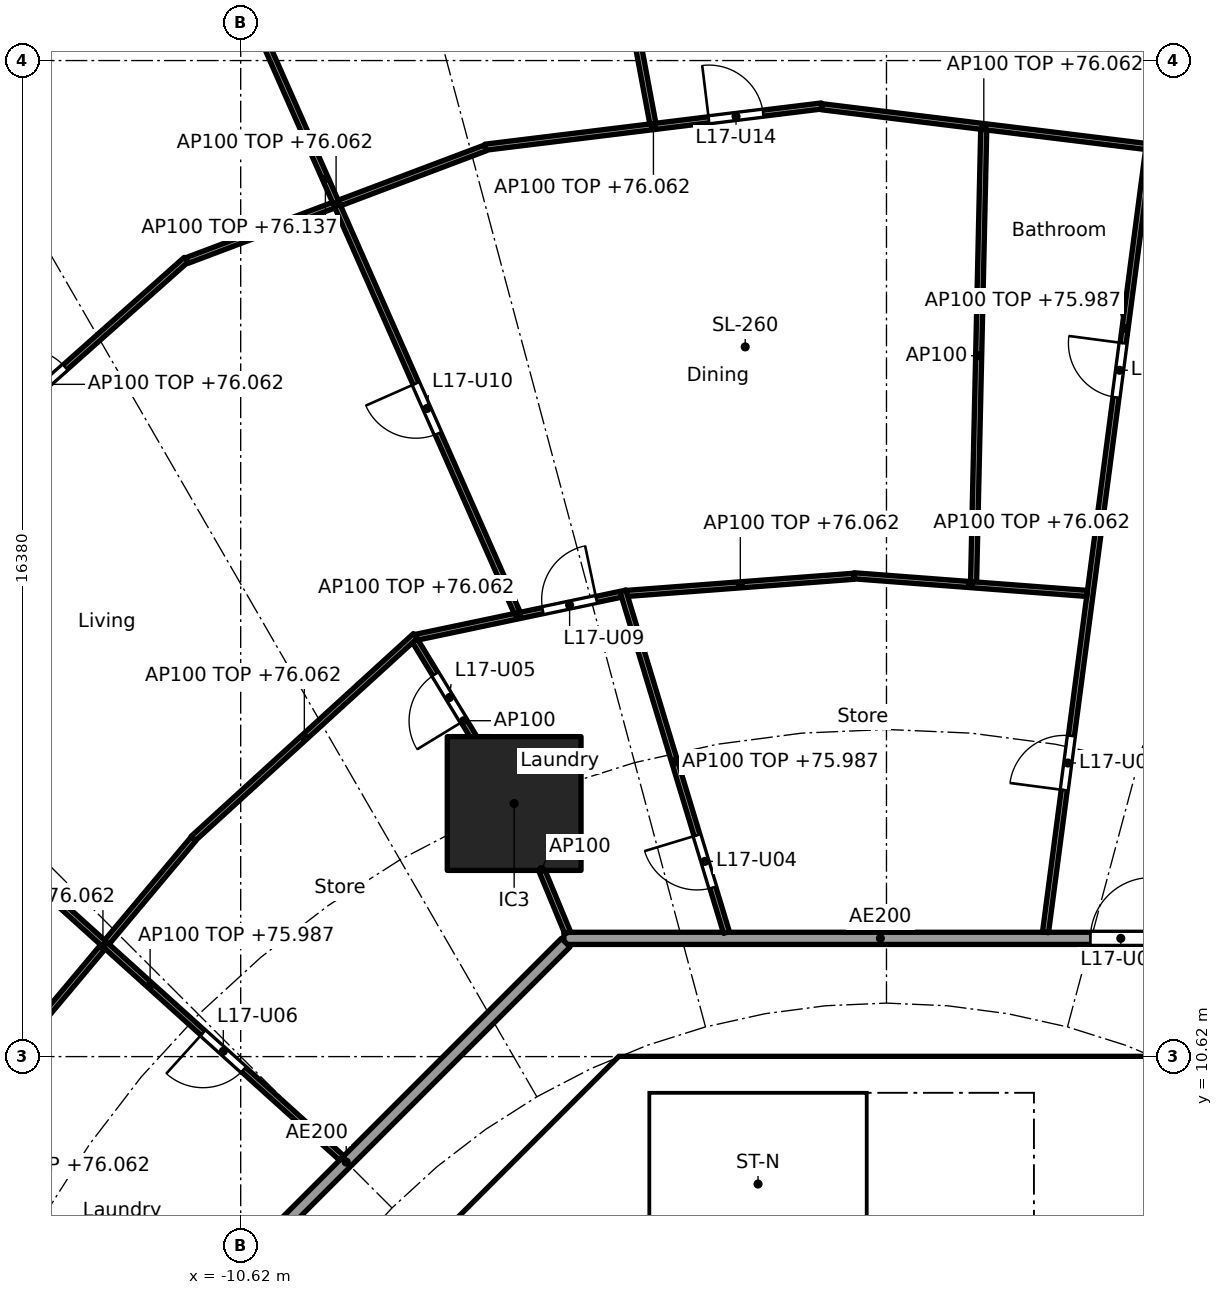
"""IFC4 building model, lengths in metres.
Left out: names, types, materials, properties, quantities, classifications, styles, units other than length and angle.
Written with IfcOpenShell. Run it as: python <this file> out.ifc"""

import sys

from ifc_helpers import new_model, si_unit, direction, frame, frame_2d, origin, origin_2d, place, context, subcontext, project, spatial, polyline, rectangle, outline, extrude, element, fill, save


model = new_model("IFC4")
c1 = context("Model", 3, precision=1e-05, world=origin(), true_north=direction((0.0, 1.0)))
c2 = subcontext(c1, "Body", "Model", "MODEL_VIEW")
j1 = project(units=[si_unit("LENGTHUNIT", "METRE"), si_unit("PLANEANGLEUNIT", "RADIAN")], contexts=[c1])
p1 = place(None, origin())
s1 = spatial("IfcSite", under=j1, at=p1, CompositionType="ELEMENT")
p2 = place(p1, origin())
s2 = spatial("IfcBuilding", under=s1, at=p2, CompositionType="ELEMENT")
p3 = place(p2, frame((0.0, 0.0, 73.3)))
s3 = spatial("IfcBuildingStorey", under=s2, at=p3, CompositionType="ELEMENT", Elevation=73.3)
p4 = place(p3, frame((-6.123, 14.782, 0.0), z_axis=(0.0, 0.0, 1.0), x_axis=(1.0, 0.0, 0.0)))
e1 = element("IfcColumn", 1, at=p4, inside=s3, PredefinedType="COLUMN", context=c2, shape_type="SweptSolid", body=[
    extrude(rectangle(XDim=2.2, YDim=2.2, at=origin_2d()), origin(), (0.0, 0.0, 1.0), 3.7),
])
p5 = place(p3, frame((-4.613, 9.988, 0.0), z_axis=(0.0, 0.0, 1.0), x_axis=(-0.707106781187, -0.707106781187, 0.0)))
e2 = element("IfcWall", 2, at=p5, inside=s3, PredefinedType="SHEAR", context=c2, shape_type="SweptSolid", body=[
    extrude(rectangle(XDim=7.602, YDim=0.6, at=frame_2d((3.801, 0.0))), origin(), (0.0, 0.0, 1.0), 3.44),
])
p6 = place(p5, frame((0.351, 0.0, 0.0)))
e3 = element("IfcOpeningElement", 3, at=p6, cuts=e2, PredefinedType="OPENING", context=c2, shape_type="SweptSolid", body=[
    extrude(rectangle(XDim=1.1, YDim=2.1, at=frame_2d((0.55, 1.05))), frame((0.0, 0.31, 0.0), z_axis=(0.0, -1.0, 0.0), x_axis=(1.0, 0.0, 0.0)), (0.0, 0.0, 1.0), 0.62),
])
p7 = place(p3, frame((4.0, 7.025, 0.0), z_axis=(0.0, 0.0, 1.0), x_axis=(0.0, 1.0, 0.0)))
e4 = element("IfcWall", 4, at=p7, inside=s3, PredefinedType="SOLIDWALL", context=c2, shape_type="SweptSolid", body=[
    extrude(rectangle(XDim=3.0, YDim=0.2, at=frame_2d((1.5, 0.0))), origin(), (0.0, 0.0, 1.0), 3.44),
])
p8 = place(p7, frame((0.925, 0.0, 0.0)))
e5 = element("IfcOpeningElement", 5, at=p8, cuts=e4, PredefinedType="OPENING", context=c2, shape_type="SweptSolid", body=[
    extrude(rectangle(XDim=1.1, YDim=2.1, at=frame_2d((0.55, 1.05))), frame((0.0, 0.11, 0.0), z_axis=(0.0, -1.0, 0.0), x_axis=(1.0, 0.0, 0.0)), (0.0, 0.0, 1.0), 0.22),
])
p9 = place(p3, origin())
e6 = element("IfcWall", 6, at=p9, inside=s3, PredefinedType="SHEAR", context=c2, shape_type="SweptSolid", body=[
    extrude(outline(polyline([(-4.152, 10.025), (-4.401, 9.776), (-4.825, 10.2), (-4.401, 10.625), (4.401, 10.625), (4.825, 10.2), (4.401, 9.776), (4.152, 10.025), (-4.152, 10.025)])), origin(), (0.0, 0.0, 1.0), 3.44),
])
p10 = place(p3, origin())
e7 = element("IfcWall", 7, at=p10, inside=s3, PredefinedType="SOLIDWALL", context=c2, shape_type="SweptSolid", body=[
    extrude(outline(polyline([(-3.9, 7.025), (-4.1, 7.025), (-4.1, 10.025), (-3.9, 10.025), (-3.9, 7.025)])), origin(), (0.0, 0.0, 1.0), 3.44),
])
p11 = place(p3, frame((5.104, 12.565, 0.0), z_axis=(0.0, 0.0, 1.0), x_axis=(-1.0, 0.0, 0.0)))
e8 = element("IfcWall", 8, at=p11, inside=s3, PredefinedType="PARTITIONING", context=c2, shape_type="SweptSolid", body=[
    extrude(rectangle(XDim=10.409, YDim=0.2, at=frame_2d((5.205, 0.0))), origin(), (0.0, 0.0, 1.0), 3.44),
])
p12 = place(p11, frame((0.751, 0.0, 0.0)))
e9 = element("IfcOpeningElement", 9, at=p12, cuts=e8, PredefinedType="OPENING", context=c2, shape_type="SweptSolid", body=[
    extrude(rectangle(XDim=1.0, YDim=2.1, at=frame_2d((0.5, 1.05))), frame((0.0, 0.11, 0.0), z_axis=(0.0, -1.0, 0.0), x_axis=(1.0, 0.0, 0.0)), (0.0, 0.0, 1.0), 0.22),
])
p13 = place(p3, frame((-5.275, 12.494, 0.0), z_axis=(0.0, 0.0, 1.0), x_axis=(-0.707106781187, -0.707106781187, 0.0)))
e10 = element("IfcWall", 10, at=p13, inside=s3, PredefinedType="PARTITIONING", context=c2, shape_type="SweptSolid", body=[
    extrude(rectangle(XDim=10.209, YDim=0.2, at=frame_2d((5.104, 0.0))), origin(), (0.0, 0.0, 1.0), 3.44),
])
p14 = place(p3, frame((2.615, 12.664, 0.0), z_axis=(0.0, 0.0, 1.0), x_axis=(0.130614967904, 0.99143316979, 0.0)))
e11 = element("IfcWall", 11, at=p14, inside=s3, PredefinedType="PARTITIONING", context=c2, shape_type="SweptSolid", body=[
    extrude(rectangle(XDim=20.034, YDim=0.1, at=frame_2d((10.017, 0.0))), origin(), (0.0, 0.0, 1.0), 2.687),
])
p15 = place(p14, frame((2.359, 0.0, 0.0)))
e12 = element("IfcOpeningElement", 12, at=p15, cuts=e11, PredefinedType="OPENING", context=c2, shape_type="SweptSolid", body=[
    extrude(rectangle(XDim=0.9, YDim=2.1, at=frame_2d((0.45, 1.05))), frame((0.0, 0.06, 0.0), z_axis=(0.0, -1.0, 0.0), x_axis=(1.0, 0.0, 0.0)), (0.0, 0.0, 1.0), 0.12),
])
p16 = place(p14, frame((8.873, 0.0, 0.0)))
e13 = element("IfcOpeningElement", 13, at=p16, cuts=e11, PredefinedType="OPENING", context=c2, shape_type="SweptSolid", body=[
    extrude(rectangle(XDim=0.9, YDim=2.1, at=frame_2d((0.45, 1.05))), frame((0.0, 0.06, 0.0), z_axis=(0.0, -1.0, 0.0), x_axis=(1.0, 0.0, 0.0)), (0.0, 0.0, 1.0), 0.12),
])
p17 = place(p3, frame((3.299, 18.237, 0.0), z_axis=(0.0, 0.0, 1.0), x_axis=(-0.997152243414, 0.075414875552, 0.0)))
e14 = element("IfcWall", 14, at=p17, inside=s3, PredefinedType="PARTITIONING", context=c2, shape_type="SweptSolid", body=[
    extrude(rectangle(XDim=3.846, YDim=0.1, at=frame_2d((1.923, 0.0))), origin(), (0.0, 0.0, 1.0), 2.762),
])
p18 = place(p3, frame((4.267, 25.587, 0.0), z_axis=(0.0, 0.0, 1.0), x_axis=(-0.992576206119, 0.121624319302, 0.0)))
e15 = element("IfcWall", 15, at=p18, inside=s3, PredefinedType="PARTITIONING", context=c2, shape_type="SweptSolid", body=[
    extrude(rectangle(XDim=5.374, YDim=0.1, at=frame_2d((2.687, 0.0))), origin(), (0.0, 0.0, 1.0), 2.762),
])
p19 = place(p3, frame((1.433, 18.428, 0.0), z_axis=(0.0, 0.0, 1.0), x_axis=(0.022419421812, 0.999748653175, 0.0)))
e16 = element("IfcWall", 16, at=p19, inside=s3, PredefinedType="PARTITIONING", context=c2, shape_type="SweptSolid", body=[
    extrude(rectangle(XDim=7.438, YDim=0.1, at=frame_2d((3.719, 0.0))), origin(), (0.0, 0.0, 1.0), 3.44),
])
p20 = place(p3, frame((-0.536, 18.519, 0.0), z_axis=(0.0, 0.0, 1.0), x_axis=(-0.99715294352, -0.075405618017, 0.0)))
e17 = element("IfcWall", 17, at=p20, inside=s3, PredefinedType="PARTITIONING", context=c2, shape_type="SweptSolid", body=[
    extrude(rectangle(XDim=3.746, YDim=0.1, at=frame_2d((1.873, 0.0))), origin(), (0.0, 0.0, 1.0), 2.762),
])
p21 = place(p3, frame((-1.066, 26.253, 0.0), z_axis=(0.0, 0.0, 1.0), x_axis=(-0.992574197255, -0.121640712523, 0.0)))
e18 = element("IfcWall", 18, at=p21, inside=s3, PredefinedType="PARTITIONING", context=c2, shape_type="SweptSolid", body=[
    extrude(rectangle(XDim=5.574, YDim=0.1, at=frame_2d((2.787, 0.0))), origin(), (0.0, 0.0, 1.0), 2.762),
])
p22 = place(p21, frame((0.969, 0.0, 0.0)))
e19 = element("IfcOpeningElement", 19, at=p22, cuts=e18, PredefinedType="OPENING", context=c2, shape_type="SweptSolid", body=[
    extrude(rectangle(XDim=0.9, YDim=2.1, at=frame_2d((0.45, 1.05))), frame((0.0, 0.06, 0.0), z_axis=(0.0, -1.0, 0.0), x_axis=(1.0, 0.0, 0.0)), (0.0, 0.0, 1.0), 0.12),
])
p23 = place(p3, frame((-3.842, 25.963, 0.0), z_axis=(0.0, 0.0, 1.0), x_axis=(-0.184068442651, 0.982913428752, 0.0)))
e20 = element("IfcWall", 20, at=p23, inside=s3, PredefinedType="PARTITIONING", context=c2, shape_type="SweptSolid", body=[
    extrude(rectangle(XDim=8.506, YDim=0.1, at=frame_2d((4.253, 0.0))), origin(), (0.0, 0.0, 1.0), 2.837),
])
p24 = place(p23, frame((3.803, 0.0, 0.0)))
e21 = element("IfcOpeningElement", 21, at=p24, cuts=e20, PredefinedType="OPENING", context=c2, shape_type="SweptSolid", body=[
    extrude(rectangle(XDim=0.9, YDim=2.1, at=frame_2d((0.45, 1.05))), frame((0.0, 0.06, 0.0), z_axis=(0.0, -1.0, 0.0), x_axis=(1.0, 0.0, 0.0)), (0.0, 0.0, 1.0), 0.12),
])
p25 = place(p3, frame((-2.631, 12.66, 0.0), z_axis=(0.0, 0.0, 1.0), x_axis=(-0.290145836284, 0.956982441682, 0.0)))
e22 = element("IfcWall", 22, at=p25, inside=s3, PredefinedType="PARTITIONING", context=c2, shape_type="SweptSolid", body=[
    extrude(rectangle(XDim=5.873, YDim=0.1, at=frame_2d((2.937, 0.0))), origin(), (0.0, 0.0, 1.0), 2.687),
])
p26 = place(p25, frame((0.772, 0.0, 0.0)))
e23 = element("IfcOpeningElement", 23, at=p26, cuts=e22, PredefinedType="OPENING", context=c2, shape_type="SweptSolid", body=[
    extrude(rectangle(XDim=0.9, YDim=2.1, at=frame_2d((0.45, 1.05))), frame((0.0, 0.06, 0.0), z_axis=(0.0, -1.0, 0.0), x_axis=(1.0, 0.0, 0.0)), (0.0, 0.0, 1.0), 0.12),
])
p27 = place(p3, frame((-4.37, 18.223, 0.0), z_axis=(0.0, 0.0, 1.0), x_axis=(-0.978619056583, -0.205681166112, 0.0)))
e24 = element("IfcWall", 24, at=p27, inside=s3, PredefinedType="PARTITIONING", context=c2, shape_type="SweptSolid", body=[
    extrude(rectangle(XDim=3.438, YDim=0.1, at=frame_2d((1.719, 0.0))), origin(), (0.0, 0.0, 1.0), 2.762),
])
p28 = place(p27, frame((0.409, 0.0, 0.0)))
e25 = element("IfcOpeningElement", 25, at=p28, cuts=e24, PredefinedType="OPENING", context=c2, shape_type="SweptSolid", body=[
    extrude(rectangle(XDim=0.9, YDim=2.1, at=frame_2d((0.45, 1.05))), frame((0.0, 0.06, 0.0), z_axis=(0.0, -1.0, 0.0), x_axis=(1.0, 0.0, 0.0)), (0.0, 0.0, 1.0), 0.12),
])
p29 = place(p3, frame((-6.596, 25.563, 0.0), z_axis=(0.0, 0.0, 1.0), x_axis=(-0.9356162121, -0.353018843201, 0.0)))
e26 = element("IfcWall", 26, at=p29, inside=s3, PredefinedType="PARTITIONING", context=c2, shape_type="SweptSolid", body=[
    extrude(rectangle(XDim=5.249, YDim=0.1, at=frame_2d((2.625, 0.0))), origin(), (0.0, 0.0, 1.0), 2.762),
])
p30 = place(p3, frame((-6.072, 17.915, 0.0), z_axis=(0.0, 0.0, 1.0), x_axis=(-0.404139814253, 0.914697223422, 0.0)))
e27 = element("IfcWall", 27, at=p30, inside=s3, PredefinedType="PARTITIONING", context=c2, shape_type="SweptSolid", body=[
    extrude(rectangle(XDim=15.614, YDim=0.1, at=frame_2d((7.807, 0.0))), origin(), (0.0, 0.0, 1.0), 2.837),
])
p31 = place(p30, frame((3.226, 0.0, 0.0)))
e28 = element("IfcOpeningElement", 28, at=p31, cuts=e27, PredefinedType="OPENING", context=c2, shape_type="SweptSolid", body=[
    extrude(rectangle(XDim=0.9, YDim=2.1, at=frame_2d((0.45, 1.05))), frame((0.0, 0.06, 0.0), z_axis=(0.0, -1.0, 0.0), x_axis=(1.0, 0.0, 0.0)), (0.0, 0.0, 1.0), 0.12),
])
p32 = place(p3, frame((-5.243, 12.657, 0.0), z_axis=(0.0, 0.0, 1.0), x_axis=(-0.382703272338, 0.923871314276, 0.0)))
e29 = element("IfcWall", 29, at=p32, inside=s3, PredefinedType="PARTITIONING", context=c2, shape_type="SweptSolid", body=[
    extrude(rectangle(XDim=2.249, YDim=0.1, at=frame_2d((1.125, 0.0))), origin(), (0.0, 0.0, 1.0), 3.44),
])
p33 = place(p3, frame((-6.149, 14.825, 0.0), z_axis=(0.0, 0.0, 1.0), x_axis=(-0.520433196839, 0.853902387646, 0.0)))
e30 = element("IfcWall", 30, at=p33, inside=s3, PredefinedType="PARTITIONING", context=c2, shape_type="SweptSolid", body=[
    extrude(rectangle(XDim=3.09, YDim=0.1, at=frame_2d((1.545, 0.0))), origin(), (0.0, 0.0, 1.0), 3.44),
])
p34 = place(p33, frame((1.542, 0.0, 0.0)))
e31 = element("IfcOpeningElement", 31, at=p34, cuts=e30, PredefinedType="OPENING", context=c2, shape_type="SweptSolid", body=[
    extrude(rectangle(XDim=0.9, YDim=2.1, at=frame_2d((0.45, 1.05))), frame((0.0, 0.06, 0.0), z_axis=(0.0, -1.0, 0.0), x_axis=(1.0, 0.0, 0.0)), (0.0, 0.0, 1.0), 0.12),
])
p35 = place(p3, frame((-7.746, 17.539, 0.0), z_axis=(0.0, 0.0, 1.0), x_axis=(-0.738860434967, -0.673858484877, 0.0)))
e32 = element("IfcWall", 32, at=p35, inside=s3, PredefinedType="PARTITIONING", context=c2, shape_type="SweptSolid", body=[
    extrude(rectangle(XDim=4.947, YDim=0.1, at=frame_2d((2.473, 0.0))), origin(), (0.0, 0.0, 1.0), 2.762),
])
p36 = place(p3, frame((-11.516, 23.726, 0.0), z_axis=(0.0, 0.0, 1.0), x_axis=(-0.747428955243, -0.664341747043, 0.0)))
e33 = element("IfcWall", 33, at=p36, inside=s3, PredefinedType="PARTITIONING", context=c2, shape_type="SweptSolid", body=[
    extrude(rectangle(XDim=6.174, YDim=0.1, at=frame_2d((3.087, 0.0))), origin(), (0.0, 0.0, 1.0), 2.762),
])
p37 = place(p36, frame((2.662, 0.0, 0.0)))
e34 = element("IfcOpeningElement", 34, at=p37, cuts=e33, PredefinedType="OPENING", context=c2, shape_type="SweptSolid", body=[
    extrude(rectangle(XDim=0.9, YDim=2.1, at=frame_2d((0.45, 1.05))), frame((0.0, 0.06, 0.0), z_axis=(0.0, -1.0, 0.0), x_axis=(1.0, 0.0, 0.0)), (0.0, 0.0, 1.0), 0.12),
])
p38 = place(p3, frame((-11.396, 14.202, 0.0), z_axis=(0.0, 0.0, 1.0), x_axis=(-0.642475660273, -0.766306091557, 0.0)))
e35 = element("IfcWall", 35, at=p38, inside=s3, PredefinedType="PARTITIONING", context=c2, shape_type="SweptSolid", body=[
    extrude(rectangle(XDim=4.637, YDim=0.1, at=frame_2d((2.319, 0.0))), origin(), (0.0, 0.0, 1.0), 2.762),
])
p39 = place(p3, frame((-8.959, 8.952, 0.0), z_axis=(0.0, 0.0, 1.0), x_axis=(-0.742679904999, 0.669646592398, 0.0)))
e36 = element("IfcWall", 36, at=p39, inside=s3, PredefinedType="PARTITIONING", context=c2, shape_type="SweptSolid", body=[
    extrude(rectangle(XDim=12.121, YDim=0.1, at=frame_2d((6.061, 0.0))), origin(), (0.0, 0.0, 1.0), 2.687),
])
p40 = place(p39, frame((2.172, 0.0, 0.0)))
e37 = element("IfcOpeningElement", 37, at=p40, cuts=e36, PredefinedType="OPENING", context=c2, shape_type="SweptSolid", body=[
    extrude(rectangle(XDim=0.9, YDim=2.1, at=frame_2d((0.45, 1.05))), frame((0.0, 0.06, 0.0), z_axis=(0.0, -1.0, 0.0), x_axis=(1.0, 0.0, 0.0)), (0.0, 0.0, 1.0), 0.12),
])
p41 = place(p39, frame((8.233, 0.0, 0.0)))
e38 = element("IfcOpeningElement", 38, at=p41, cuts=e36, PredefinedType="OPENING", context=c2, shape_type="SweptSolid", body=[
    extrude(rectangle(XDim=0.9, YDim=2.1, at=frame_2d((0.45, 1.05))), frame((0.0, 0.06, 0.0), z_axis=(0.0, -1.0, 0.0), x_axis=(1.0, 0.0, 0.0)), (0.0, 0.0, 1.0), 0.12),
])
p42 = place(p8, origin())
e39 = element("IfcDoor", 39, at=p42, inside=s3, OperationType="SINGLE_SWING_LEFT", PredefinedType="DOOR", context=c2, shape_type="SweptSolid", body=[
    extrude(rectangle(XDim=1.1, YDim=2.1, at=frame_2d((0.55, 1.05))), frame((0.0, 0.025, 0.0), z_axis=(0.0, -1.0, 0.0), x_axis=(1.0, 0.0, 0.0)), (0.0, 0.0, 1.0), 0.05),
])
fill(e5, e39)
p43 = place(p6, origin())
e40 = element("IfcDoor", 40, at=p43, inside=s3, OperationType="SINGLE_SWING_LEFT", PredefinedType="DOOR", context=c2, shape_type="SweptSolid", body=[
    extrude(rectangle(XDim=1.1, YDim=2.1, at=frame_2d((0.55, 1.05))), frame((0.0, 0.025, 0.0), z_axis=(0.0, -1.0, 0.0), x_axis=(1.0, 0.0, 0.0)), (0.0, 0.0, 1.0), 0.05),
])
fill(e3, e40)
p44 = place(p12, frame((1.0, 0.0, 0.0), x_axis=(-1.0, 0.0, 0.0)))
e41 = element("IfcDoor", 41, at=p44, inside=s3, OperationType="SINGLE_SWING_RIGHT", PredefinedType="DOOR", context=c2, shape_type="SweptSolid", body=[
    extrude(rectangle(XDim=1.0, YDim=2.1, at=frame_2d((0.5, 1.05))), frame((0.0, 0.025, 0.0), z_axis=(0.0, -1.0, 0.0), x_axis=(1.0, 0.0, 0.0)), (0.0, 0.0, 1.0), 0.05),
])
fill(e9, e41)
p45 = place(p15, origin())
e42 = element("IfcDoor", 42, at=p45, inside=s3, OperationType="SINGLE_SWING_LEFT", PredefinedType="DOOR", context=c2, shape_type="SweptSolid", body=[
    extrude(rectangle(XDim=0.9, YDim=2.1, at=frame_2d((0.45, 1.05))), frame((0.0, 0.025, 0.0), z_axis=(0.0, -1.0, 0.0), x_axis=(1.0, 0.0, 0.0)), (0.0, 0.0, 1.0), 0.05),
])
fill(e12, e42)
p46 = place(p26, origin())
e43 = element("IfcDoor", 43, at=p46, inside=s3, OperationType="SINGLE_SWING_RIGHT", PredefinedType="DOOR", context=c2, shape_type="SweptSolid", body=[
    extrude(rectangle(XDim=0.9, YDim=2.1, at=frame_2d((0.45, 1.05))), frame((0.0, 0.025, 0.0), z_axis=(0.0, -1.0, 0.0), x_axis=(1.0, 0.0, 0.0)), (0.0, 0.0, 1.0), 0.05),
])
fill(e23, e43)
p47 = place(p34, origin())
e44 = element("IfcDoor", 44, at=p47, inside=s3, OperationType="SINGLE_SWING_LEFT", PredefinedType="DOOR", context=c2, shape_type="SweptSolid", body=[
    extrude(rectangle(XDim=0.9, YDim=2.1, at=frame_2d((0.45, 1.05))), frame((0.0, 0.025, 0.0), z_axis=(0.0, -1.0, 0.0), x_axis=(1.0, 0.0, 0.0)), (0.0, 0.0, 1.0), 0.05),
])
fill(e31, e44)
p48 = place(p40, origin())
e45 = element("IfcDoor", 45, at=p48, inside=s3, OperationType="SINGLE_SWING_RIGHT", PredefinedType="DOOR", context=c2, shape_type="SweptSolid", body=[
    extrude(rectangle(XDim=0.9, YDim=2.1, at=frame_2d((0.45, 1.05))), frame((0.0, 0.025, 0.0), z_axis=(0.0, -1.0, 0.0), x_axis=(1.0, 0.0, 0.0)), (0.0, 0.0, 1.0), 0.05),
])
fill(e37, e45)
p49 = place(p16, origin())
e46 = element("IfcDoor", 46, at=p49, inside=s3, OperationType="SINGLE_SWING_RIGHT", PredefinedType="DOOR", context=c2, shape_type="SweptSolid", body=[
    extrude(rectangle(XDim=0.9, YDim=2.1, at=frame_2d((0.45, 1.05))), frame((0.0, 0.025, 0.0), z_axis=(0.0, -1.0, 0.0), x_axis=(1.0, 0.0, 0.0)), (0.0, 0.0, 1.0), 0.05),
])
fill(e13, e46)
p50 = place(p28, frame((0.9, 0.0, 0.0), x_axis=(-1.0, 0.0, 0.0)))
e47 = element("IfcDoor", 47, at=p50, inside=s3, OperationType="SINGLE_SWING_RIGHT", PredefinedType="DOOR", context=c2, shape_type="SweptSolid", body=[
    extrude(rectangle(XDim=0.9, YDim=2.1, at=frame_2d((0.45, 1.05))), frame((0.0, 0.025, 0.0), z_axis=(0.0, -1.0, 0.0), x_axis=(1.0, 0.0, 0.0)), (0.0, 0.0, 1.0), 0.05),
])
fill(e25, e47)
p51 = place(p31, origin())
e48 = element("IfcDoor", 48, at=p51, inside=s3, OperationType="SINGLE_SWING_RIGHT", PredefinedType="DOOR", context=c2, shape_type="SweptSolid", body=[
    extrude(rectangle(XDim=0.9, YDim=2.1, at=frame_2d((0.45, 1.05))), frame((0.0, 0.025, 0.0), z_axis=(0.0, -1.0, 0.0), x_axis=(1.0, 0.0, 0.0)), (0.0, 0.0, 1.0), 0.05),
])
fill(e28, e48)
p52 = place(p22, frame((0.9, 0.0, 0.0), x_axis=(-1.0, 0.0, 0.0)))
e49 = element("IfcDoor", 49, at=p52, inside=s3, OperationType="SINGLE_SWING_LEFT", PredefinedType="DOOR", context=c2, shape_type="SweptSolid", body=[
    extrude(rectangle(XDim=0.9, YDim=2.1, at=frame_2d((0.45, 1.05))), frame((0.0, 0.025, 0.0), z_axis=(0.0, -1.0, 0.0), x_axis=(1.0, 0.0, 0.0)), (0.0, 0.0, 1.0), 0.05),
])
fill(e19, e49)
p53 = place(p37, frame((0.9, 0.0, 0.0), x_axis=(-1.0, 0.0, 0.0)))
e50 = element("IfcDoor", 50, at=p53, inside=s3, OperationType="SINGLE_SWING_LEFT", PredefinedType="DOOR", context=c2, shape_type="SweptSolid", body=[
    extrude(rectangle(XDim=0.9, YDim=2.1, at=frame_2d((0.45, 1.05))), frame((0.0, 0.025, 0.0), z_axis=(0.0, -1.0, 0.0), x_axis=(1.0, 0.0, 0.0)), (0.0, 0.0, 1.0), 0.05),
])
fill(e34, e50)
save(model, sys.argv[1])
